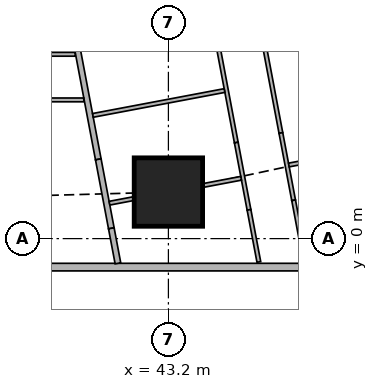
"""IFC4 building model, lengths in metres.
Left out: names, types, materials, properties, quantities, classifications, styles, units other than length and angle.
Written with IfcOpenShell. Run it as: python <this file> out.ifc"""

import sys

from ifc_helpers import new_model, si_unit, direction, frame, frame_2d, origin, origin_2d, place, context, subcontext, project, spatial, rectangle, extrude, element, fill, save


model = new_model("IFC4")
c1 = context("Model", 3, precision=1e-05, world=origin(), true_north=direction((0.0, 1.0)))
c2 = subcontext(c1, "Body", "Model", "MODEL_VIEW")
j1 = project(units=[si_unit("LENGTHUNIT", "METRE"), si_unit("PLANEANGLEUNIT", "RADIAN")], contexts=[c1])
p1 = place(None, origin())
s1 = spatial("IfcSite", under=j1, at=p1, CompositionType="ELEMENT")
p2 = place(p1, origin())
s2 = spatial("IfcBuilding", under=s1, at=p2, CompositionType="ELEMENT")
p3 = place(p2, frame((0.0, 0.0, 139.55)))
s3 = spatial("IfcBuildingStorey", under=s2, at=p3, CompositionType="ELEMENT", Elevation=139.55)
p4 = place(p3, frame((43.2, 1.225, 0.0), z_axis=(0.0, 0.0, 1.0), x_axis=(1.0, 0.0, 0.0)))
e1 = element("IfcColumn", 1, at=p4, inside=s3, PredefinedType="COLUMN", context=c2, shape_type="SweptSolid", body=[
    extrude(rectangle(XDim=1.8, YDim=1.8, at=origin_2d()), origin(), (0.0, 0.0, 1.0), 3.75),
])
p5 = place(p3, frame((2.163, -0.75, 0.0), z_axis=(0.0, 0.0, 1.0), x_axis=(1.0, 0.0, 0.0)))
e2 = element("IfcWall", 2, at=p5, inside=s3, PredefinedType="SOLIDWALL", context=c2, shape_type="SweptSolid", body=[
    extrude(rectangle(XDim=45.628, YDim=0.2, at=frame_2d((22.814, 0.0))), origin(), (0.0, 0.0, 1.0), 3.5),
])
p6 = place(p5, frame((9.537, 0.0, 0.9)))
e3 = element("IfcOpeningElement", 3, at=p6, cuts=e2, PredefinedType="OPENING", context=c2, shape_type="SweptSolid", body=[
    extrude(rectangle(XDim=1.8, YDim=1.5, at=frame_2d((0.9, 0.75))), frame((0.0, 0.11, 0.0), z_axis=(0.0, -1.0, 0.0), x_axis=(1.0, 0.0, 0.0)), (0.0, 0.0, 1.0), 0.22),
])
p7 = place(p5, frame((13.137, 0.0, 0.9)))
e4 = element("IfcOpeningElement", 4, at=p7, cuts=e2, PredefinedType="OPENING", context=c2, shape_type="SweptSolid", body=[
    extrude(rectangle(XDim=1.8, YDim=1.5, at=frame_2d((0.9, 0.75))), frame((0.0, 0.11, 0.0), z_axis=(0.0, -1.0, 0.0), x_axis=(1.0, 0.0, 0.0)), (0.0, 0.0, 1.0), 0.22),
])
p8 = place(p5, frame((16.737, 0.0, 0.9)))
e5 = element("IfcOpeningElement", 5, at=p8, cuts=e2, PredefinedType="OPENING", context=c2, shape_type="SweptSolid", body=[
    extrude(rectangle(XDim=1.8, YDim=1.5, at=frame_2d((0.9, 0.75))), frame((0.0, 0.11, 0.0), z_axis=(0.0, -1.0, 0.0), x_axis=(1.0, 0.0, 0.0)), (0.0, 0.0, 1.0), 0.22),
])
p9 = place(p5, frame((20.337, 0.0, 0.9)))
e6 = element("IfcOpeningElement", 6, at=p9, cuts=e2, PredefinedType="OPENING", context=c2, shape_type="SweptSolid", body=[
    extrude(rectangle(XDim=1.8, YDim=1.5, at=frame_2d((0.9, 0.75))), frame((0.0, 0.11, 0.0), z_axis=(0.0, -1.0, 0.0), x_axis=(1.0, 0.0, 0.0)), (0.0, 0.0, 1.0), 0.22),
])
p10 = place(p5, frame((23.937, 0.0, 0.9)))
e7 = element("IfcOpeningElement", 7, at=p10, cuts=e2, PredefinedType="OPENING", context=c2, shape_type="SweptSolid", body=[
    extrude(rectangle(XDim=1.8, YDim=1.5, at=frame_2d((0.9, 0.75))), frame((0.0, 0.11, 0.0), z_axis=(0.0, -1.0, 0.0), x_axis=(1.0, 0.0, 0.0)), (0.0, 0.0, 1.0), 0.22),
])
p11 = place(p5, frame((27.537, 0.0, 0.9)))
e8 = element("IfcOpeningElement", 8, at=p11, cuts=e2, PredefinedType="OPENING", context=c2, shape_type="SweptSolid", body=[
    extrude(rectangle(XDim=1.8, YDim=1.5, at=frame_2d((0.9, 0.75))), frame((0.0, 0.11, 0.0), z_axis=(0.0, -1.0, 0.0), x_axis=(1.0, 0.0, 0.0)), (0.0, 0.0, 1.0), 0.22),
])
p12 = place(p5, frame((31.137, 0.0, 0.9)))
e9 = element("IfcOpeningElement", 9, at=p12, cuts=e2, PredefinedType="OPENING", context=c2, shape_type="SweptSolid", body=[
    extrude(rectangle(XDim=1.8, YDim=1.5, at=frame_2d((0.9, 0.75))), frame((0.0, 0.11, 0.0), z_axis=(0.0, -1.0, 0.0), x_axis=(1.0, 0.0, 0.0)), (0.0, 0.0, 1.0), 0.22),
])
p13 = place(p5, frame((34.737, 0.0, 0.9)))
e10 = element("IfcOpeningElement", 10, at=p13, cuts=e2, PredefinedType="OPENING", context=c2, shape_type="SweptSolid", body=[
    extrude(rectangle(XDim=1.8, YDim=1.5, at=frame_2d((0.9, 0.75))), frame((0.0, 0.11, 0.0), z_axis=(0.0, -1.0, 0.0), x_axis=(1.0, 0.0, 0.0)), (0.0, 0.0, 1.0), 0.22),
])
p14 = place(p3, frame((50.653, 2.703, 0.0), z_axis=(0.0, 0.0, 1.0), x_axis=(-0.185612026696, 0.982623109613, 0.0)))
e11 = element("IfcWall", 11, at=p14, inside=s3, PredefinedType="SOLIDWALL", context=c2, shape_type="SweptSolid", body=[
    extrude(rectangle(XDim=41.393, YDim=0.2, at=frame_2d((20.697, 0.0))), origin(), (0.0, 0.0, 1.0), 3.5),
])
p15 = place(p14, frame((1.633, 0.0, 0.9)))
e12 = element("IfcOpeningElement", 12, at=p15, cuts=e11, PredefinedType="OPENING", context=c2, shape_type="SweptSolid", body=[
    extrude(rectangle(XDim=1.8, YDim=1.5, at=frame_2d((0.9, 0.75))), frame((0.0, 0.11, 0.0), z_axis=(0.0, -1.0, 0.0), x_axis=(1.0, 0.0, 0.0)), (0.0, 0.0, 1.0), 0.22),
])
p16 = place(p14, frame((6.032, 0.0, 0.9)))
e13 = element("IfcOpeningElement", 13, at=p16, cuts=e11, PredefinedType="OPENING", context=c2, shape_type="SweptSolid", body=[
    extrude(rectangle(XDim=1.8, YDim=1.5, at=frame_2d((0.9, 0.75))), frame((0.0, 0.11, 0.0), z_axis=(0.0, -1.0, 0.0), x_axis=(1.0, 0.0, 0.0)), (0.0, 0.0, 1.0), 0.22),
])
p17 = place(p14, frame((9.848, 0.0, 0.9)))
e14 = element("IfcOpeningElement", 14, at=p17, cuts=e11, PredefinedType="OPENING", context=c2, shape_type="SweptSolid", body=[
    extrude(rectangle(XDim=1.8, YDim=1.5, at=frame_2d((0.9, 0.75))), frame((0.0, 0.11, 0.0), z_axis=(0.0, -1.0, 0.0), x_axis=(1.0, 0.0, 0.0)), (0.0, 0.0, 1.0), 0.22),
])
p18 = place(p14, frame((13.664, 0.0, 0.9)))
e15 = element("IfcOpeningElement", 15, at=p18, cuts=e11, PredefinedType="OPENING", context=c2, shape_type="SweptSolid", body=[
    extrude(rectangle(XDim=1.8, YDim=1.5, at=frame_2d((0.9, 0.75))), frame((0.0, 0.11, 0.0), z_axis=(0.0, -1.0, 0.0), x_axis=(1.0, 0.0, 0.0)), (0.0, 0.0, 1.0), 0.22),
])
p19 = place(p14, frame((17.481, 0.0, 0.9)))
e16 = element("IfcOpeningElement", 16, at=p19, cuts=e11, PredefinedType="OPENING", context=c2, shape_type="SweptSolid", body=[
    extrude(rectangle(XDim=1.8, YDim=1.5, at=frame_2d((0.9, 0.75))), frame((0.0, 0.11, 0.0), z_axis=(0.0, -1.0, 0.0), x_axis=(1.0, 0.0, 0.0)), (0.0, 0.0, 1.0), 0.22),
])
p20 = place(p14, frame((21.297, 0.0, 0.9)))
e17 = element("IfcOpeningElement", 17, at=p20, cuts=e11, PredefinedType="OPENING", context=c2, shape_type="SweptSolid", body=[
    extrude(rectangle(XDim=1.8, YDim=1.5, at=frame_2d((0.9, 0.75))), frame((0.0, 0.11, 0.0), z_axis=(0.0, -1.0, 0.0), x_axis=(1.0, 0.0, 0.0)), (0.0, 0.0, 1.0), 0.22),
])
p21 = place(p14, frame((25.113, 0.0, 0.9)))
e18 = element("IfcOpeningElement", 18, at=p21, cuts=e11, PredefinedType="OPENING", context=c2, shape_type="SweptSolid", body=[
    extrude(rectangle(XDim=1.8, YDim=1.5, at=frame_2d((0.9, 0.75))), frame((0.0, 0.11, 0.0), z_axis=(0.0, -1.0, 0.0), x_axis=(1.0, 0.0, 0.0)), (0.0, 0.0, 1.0), 0.22),
])
p22 = place(p14, frame((28.93, 0.0, 0.9)))
e19 = element("IfcOpeningElement", 19, at=p22, cuts=e11, PredefinedType="OPENING", context=c2, shape_type="SweptSolid", body=[
    extrude(rectangle(XDim=1.8, YDim=1.5, at=frame_2d((0.9, 0.75))), frame((0.0, 0.11, 0.0), z_axis=(0.0, -1.0, 0.0), x_axis=(1.0, 0.0, 0.0)), (0.0, 0.0, 1.0), 0.22),
])
p23 = place(p14, frame((32.746, 0.0, 0.9)))
e20 = element("IfcOpeningElement", 20, at=p23, cuts=e11, PredefinedType="OPENING", context=c2, shape_type="SweptSolid", body=[
    extrude(rectangle(XDim=1.8, YDim=1.5, at=frame_2d((0.9, 0.75))), frame((0.0, 0.11, 0.0), z_axis=(0.0, -1.0, 0.0), x_axis=(1.0, 0.0, 0.0)), (0.0, 0.0, 1.0), 0.22),
])
p24 = place(p14, frame((36.481, 0.0, 0.9)))
e21 = element("IfcOpeningElement", 21, at=p24, cuts=e11, PredefinedType="OPENING", context=c2, shape_type="SweptSolid", body=[
    extrude(rectangle(XDim=1.8, YDim=1.5, at=frame_2d((0.9, 0.75))), frame((0.0, 0.11, 0.0), z_axis=(0.0, -1.0, 0.0), x_axis=(1.0, 0.0, 0.0)), (0.0, 0.0, 1.0), 0.22),
])
p25 = place(p3, frame((33.623, 43.022, 0.0), z_axis=(0.0, 0.0, 1.0), x_axis=(0.185596841028, -0.98262597798, 0.0)))
e22 = element("IfcWall", 22, at=p25, inside=s3, PredefinedType="SOLIDWALL", context=c2, shape_type="SweptSolid", body=[
    extrude(rectangle(XDim=41.66, YDim=0.15, at=frame_2d((20.83, 0.0))), origin(), (0.0, 0.0, 1.0), 2.5),
])
p26 = place(p25, frame((20.242, 0.0, 0.0)))
e23 = element("IfcOpeningElement", 23, at=p26, cuts=e22, PredefinedType="OPENING", context=c2, shape_type="SweptSolid", body=[
    extrude(rectangle(XDim=1.0, YDim=2.1, at=frame_2d((0.5, 1.05))), frame((0.0, 0.085, 0.0), z_axis=(0.0, -1.0, 0.0), x_axis=(1.0, 0.0, 0.0)), (0.0, 0.0, 1.0), 0.17),
])
p27 = place(p25, frame((24.714, 0.0, 0.0)))
e24 = element("IfcOpeningElement", 24, at=p27, cuts=e22, PredefinedType="OPENING", context=c2, shape_type="SweptSolid", body=[
    extrude(rectangle(XDim=1.0, YDim=2.1, at=frame_2d((0.5, 1.05))), frame((0.0, 0.085, 0.0), z_axis=(0.0, -1.0, 0.0), x_axis=(1.0, 0.0, 0.0)), (0.0, 0.0, 1.0), 0.17),
])
p28 = place(p25, frame((31.206, 0.0, 0.0)))
e25 = element("IfcOpeningElement", 25, at=p28, cuts=e22, PredefinedType="OPENING", context=c2, shape_type="SweptSolid", body=[
    extrude(rectangle(XDim=1.0, YDim=2.1, at=frame_2d((0.5, 1.05))), frame((0.0, 0.085, 0.0), z_axis=(0.0, -1.0, 0.0), x_axis=(1.0, 0.0, 0.0)), (0.0, 0.0, 1.0), 0.17),
])
p29 = place(p3, frame((41.355, 2.086, 0.0), z_axis=(0.0, 0.0, 1.0), x_axis=(0.185708872674, -0.982604811005, 0.0)))
e26 = element("IfcWall", 26, at=p29, inside=s3, PredefinedType="SOLIDWALL", context=c2, shape_type="SweptSolid", body=[
    extrude(rectangle(XDim=1.847, YDim=0.15, at=frame_2d((0.924, 0.0))), origin(), (0.0, 0.0, 1.0), 2.1),
])
p30 = place(p3, frame((41.698, 0.271, 0.0), z_axis=(0.0, 0.0, 1.0), x_axis=(0.185735329995, -0.982599810295, 0.0)))
e27 = element("IfcWall", 27, at=p30, inside=s3, PredefinedType="SOLIDWALL", context=c2, shape_type="SweptSolid", body=[
    extrude(rectangle(XDim=0.937, YDim=0.15, at=frame_2d((0.469, 0.0))), origin(), (0.0, 0.0, 1.0), 3.5),
])
p31 = place(p3, frame((40.974, 3.65, 0.0), z_axis=(0.0, 0.0, 1.0), x_axis=(-1.0, 0.0, 0.0)))
e28 = element("IfcWall", 28, at=p31, inside=s3, PredefinedType="PARTITIONING", context=c2, shape_type="SweptSolid", body=[
    extrude(rectangle(XDim=4.974, YDim=0.1, at=frame_2d((2.487, 0.0))), origin(), (0.0, 0.0, 1.0), 3.5),
])
p32 = place(p31, frame((3.874, 0.0, 0.0)))
e29 = element("IfcOpeningElement", 29, at=p32, cuts=e28, PredefinedType="OPENING", context=c2, shape_type="SweptSolid", body=[
    extrude(rectangle(XDim=0.9, YDim=2.1, at=frame_2d((0.45, 1.05))), frame((0.0, 0.06, 0.0), z_axis=(0.0, -1.0, 0.0), x_axis=(1.0, 0.0, 0.0)), (0.0, 0.0, 1.0), 0.12),
])
p33 = place(p3, frame((40.747, 4.85, 0.0), z_axis=(0.0, 0.0, 1.0), x_axis=(-1.0, 0.0, 0.0)))
e30 = element("IfcWall", 30, at=p33, inside=s3, PredefinedType="PARTITIONING", context=c2, shape_type="SweptSolid", body=[
    extrude(rectangle(XDim=4.747, YDim=0.1, at=frame_2d((2.374, 0.0))), origin(), (0.0, 0.0, 1.0), 3.5),
])
p34 = place(p33, frame((3.272, 0.0, 0.0)))
e31 = element("IfcOpeningElement", 31, at=p34, cuts=e30, PredefinedType="OPENING", context=c2, shape_type="SweptSolid", body=[
    extrude(rectangle(XDim=0.9, YDim=2.1, at=frame_2d((0.45, 1.05))), frame((0.0, 0.06, 0.0), z_axis=(0.0, -1.0, 0.0), x_axis=(1.0, 0.0, 0.0)), (0.0, 0.0, 1.0), 0.12),
])
p35 = place(p33, frame((0.15, 0.0, 0.0)))
e32 = element("IfcOpeningElement", 32, at=p35, cuts=e30, PredefinedType="OPENING", context=c2, shape_type="SweptSolid", body=[
    extrude(rectangle(XDim=0.9, YDim=2.1, at=frame_2d((0.45, 1.05))), frame((0.0, 0.06, 0.0), z_axis=(0.0, -1.0, 0.0), x_axis=(1.0, 0.0, 0.0)), (0.0, 0.0, 1.0), 0.12),
])
p36 = place(p33, frame((1.472, 0.0, 0.0)))
e33 = element("IfcOpeningElement", 33, at=p36, cuts=e30, PredefinedType="OPENING", context=c2, shape_type="SweptSolid", body=[
    extrude(rectangle(XDim=0.9, YDim=2.1, at=frame_2d((0.45, 1.05))), frame((0.0, 0.06, 0.0), z_axis=(0.0, -1.0, 0.0), x_axis=(1.0, 0.0, 0.0)), (0.0, 0.0, 1.0), 0.12),
])
p37 = place(p3, frame((44.727, 10.366, 0.0), z_axis=(0.0, 0.0, 1.0), x_axis=(0.185578957652, -0.982629355595, 0.0)))
e34 = element("IfcWall", 34, at=p37, inside=s3, PredefinedType="PARTITIONING", context=c2, shape_type="SweptSolid", body=[
    extrude(rectangle(XDim=7.721, YDim=0.1, at=frame_2d((3.86, 0.0))), origin(), (0.0, 0.0, 1.0), 3.5),
])
p38 = place(p37, frame((0.151, 0.0, 0.0)))
e35 = element("IfcOpeningElement", 35, at=p38, cuts=e34, PredefinedType="OPENING", context=c2, shape_type="SweptSolid", body=[
    extrude(rectangle(XDim=0.9, YDim=2.1, at=frame_2d((0.45, 1.05))), frame((0.0, 0.06, 0.0), z_axis=(0.0, -1.0, 0.0), x_axis=(1.0, 0.0, 0.0)), (0.0, 0.0, 1.0), 0.12),
])
p39 = place(p37, frame((3.806, 0.0, 0.0)))
e36 = element("IfcOpeningElement", 36, at=p39, cuts=e34, PredefinedType="OPENING", context=c2, shape_type="SweptSolid", body=[
    extrude(rectangle(XDim=0.9, YDim=2.1, at=frame_2d((0.45, 1.05))), frame((0.0, 0.06, 0.0), z_axis=(0.0, -1.0, 0.0), x_axis=(1.0, 0.0, 0.0)), (0.0, 0.0, 1.0), 0.12),
])
p40 = place(p3, frame((46.16, 2.779, 0.0), z_axis=(0.0, 0.0, 1.0), x_axis=(0.18597295662, -0.982554863306, 0.0)))
e37 = element("IfcWall", 37, at=p40, inside=s3, PredefinedType="PARTITIONING", context=c2, shape_type="SweptSolid", body=[
    extrude(rectangle(XDim=1.802, YDim=0.1, at=frame_2d((0.901, 0.0))), origin(), (0.0, 0.0, 1.0), 2.1),
])
p41 = place(p3, frame((46.495, 1.008, 0.0), z_axis=(0.0, 0.0, 1.0), x_axis=(0.185535059532, -0.982637645159, 0.0)))
e38 = element("IfcWall", 38, at=p41, inside=s3, PredefinedType="PARTITIONING", context=c2, shape_type="SweptSolid", body=[
    extrude(rectangle(XDim=1.644, YDim=0.1, at=frame_2d((0.822, 0.0))), origin(), (0.0, 0.0, 1.0), 3.5),
])
p42 = place(p3, frame((43.999, 7.755, 0.0), z_axis=(0.0, 0.0, 1.0), x_axis=(0.185565904578, -0.982631820703, 0.0)))
e39 = element("IfcWall", 39, at=p42, inside=s3, PredefinedType="PARTITIONING", context=c2, shape_type="SweptSolid", body=[
    extrude(rectangle(XDim=5.319, YDim=0.1, at=frame_2d((2.66, 0.0))), origin(), (0.0, 0.0, 1.0), 3.5),
])
p43 = place(p42, frame((1.0, 0.0, 0.0)))
e40 = element("IfcOpeningElement", 40, at=p43, cuts=e39, PredefinedType="OPENING", context=c2, shape_type="SweptSolid", body=[
    extrude(rectangle(XDim=0.9, YDim=2.1, at=frame_2d((0.45, 1.05))), frame((0.0, 0.06, 0.0), z_axis=(0.0, -1.0, 0.0), x_axis=(1.0, 0.0, 0.0)), (0.0, 0.0, 1.0), 0.12),
])
p44 = place(p42, frame((4.269, 0.0, 0.0)))
e41 = element("IfcOpeningElement", 41, at=p44, cuts=e39, PredefinedType="OPENING", context=c2, shape_type="SweptSolid", body=[
    extrude(rectangle(XDim=0.9, YDim=2.1, at=frame_2d((0.45, 1.05))), frame((0.0, 0.06, 0.0), z_axis=(0.0, -1.0, 0.0), x_axis=(1.0, 0.0, 0.0)), (0.0, 0.0, 1.0), 0.12),
])
p45 = place(p42, frame((2.585, 0.0, 0.0)))
e42 = element("IfcOpeningElement", 42, at=p45, cuts=e39, PredefinedType="OPENING", context=c2, shape_type="SweptSolid", body=[
    extrude(rectangle(XDim=0.9, YDim=2.1, at=frame_2d((0.45, 1.05))), frame((0.0, 0.06, 0.0), z_axis=(0.0, -1.0, 0.0), x_axis=(1.0, 0.0, 0.0)), (0.0, 0.0, 1.0), 0.12),
])
p46 = place(p3, frame((44.986, 2.528, 0.0), z_axis=(0.0, 0.0, 1.0), x_axis=(0.18584218627, -0.982579605835, 0.0)))
e43 = element("IfcWall", 43, at=p46, inside=s3, PredefinedType="PARTITIONING", context=c2, shape_type="SweptSolid", body=[
    extrude(rectangle(XDim=1.802, YDim=0.1, at=frame_2d((0.901, 0.0))), origin(), (0.0, 0.0, 1.0), 2.1),
])
p47 = place(p3, frame((45.321, 0.757, 0.0), z_axis=(0.0, 0.0, 1.0), x_axis=(0.185640562635, -0.982617718904, 0.0)))
e44 = element("IfcWall", 44, at=p47, inside=s3, PredefinedType="PARTITIONING", context=c2, shape_type="SweptSolid", body=[
    extrude(rectangle(XDim=1.395, YDim=0.1, at=frame_2d((0.698, 0.0))), origin(), (0.0, 0.0, 1.0), 3.5),
])
p48 = place(p47, frame((0.15, 0.0, 0.0)))
e45 = element("IfcOpeningElement", 45, at=p48, cuts=e44, PredefinedType="OPENING", context=c2, shape_type="SweptSolid", body=[
    extrude(rectangle(XDim=0.9, YDim=2.1, at=frame_2d((0.45, 1.05))), frame((0.0, 0.06, 0.0), z_axis=(0.0, -1.0, 0.0), x_axis=(1.0, 0.0, 0.0)), (0.0, 0.0, 1.0), 0.12),
])
p49 = place(p3, frame((46.738, 2.006, 0.0), z_axis=(0.0, 0.0, 1.0), x_axis=(-0.982820466874, -0.184564161994, 0.0)))
e46 = element("IfcWall", 46, at=p49, inside=s3, PredefinedType="PARTITIONING", context=c2, shape_type="SweptSolid", body=[
    extrude(rectangle(XDim=0.374, YDim=0.1, at=frame_2d((0.187, 0.0))), origin(), (0.0, 0.0, 1.0), 2.1),
])
p50 = place(p3, frame((45.114, 1.587, 0.0), z_axis=(0.0, 0.0, 1.0), x_axis=(-0.982567886437, -0.185904138047, 0.0)))
e47 = element("IfcWall", 47, at=p50, inside=s3, PredefinedType="PARTITIONING", context=c2, shape_type="SweptSolid", body=[
    extrude(rectangle(XDim=1.022, YDim=0.1, at=frame_2d((0.511, 0.0))), origin(), (0.0, 0.0, 1.0), 2.1),
])
p51 = place(p3, frame((42.29, 1.053, 0.0), z_axis=(0.0, 0.0, 1.0), x_axis=(-0.982573945355, -0.185872111707, 0.0)))
e48 = element("IfcWall", 48, at=p51, inside=s3, PredefinedType="PARTITIONING", context=c2, shape_type="SweptSolid", body=[
    extrude(rectangle(XDim=0.652, YDim=0.1, at=frame_2d((0.326, 0.0))), origin(), (0.0, 0.0, 1.0), 2.1),
])
p52 = place(p3, frame((44.677, 3.896, 0.0), z_axis=(0.0, 0.0, 1.0), x_axis=(-0.982638553676, -0.185530247748, 0.0)))
e49 = element("IfcWall", 49, at=p52, inside=s3, PredefinedType="PARTITIONING", context=c2, shape_type="SweptSolid", body=[
    extrude(rectangle(XDim=3.525, YDim=0.1, at=frame_2d((1.763, 0.0))), origin(), (0.0, 0.0, 1.0), 3.5),
])
p53 = place(p35, origin())
e50 = element("IfcDoor", 50, at=p53, inside=s3, OperationType="SINGLE_SWING_RIGHT", PredefinedType="DOOR", context=c2, shape_type="SweptSolid", body=[
    extrude(rectangle(XDim=0.9, YDim=2.1, at=frame_2d((0.45, 1.05))), frame((0.0, 0.025, 0.0), z_axis=(0.0, -1.0, 0.0), x_axis=(1.0, 0.0, 0.0)), (0.0, 0.0, 1.0), 0.05),
])
fill(e32, e50)
p54 = place(p44, origin())
e51 = element("IfcDoor", 51, at=p54, inside=s3, OperationType="SINGLE_SWING_LEFT", PredefinedType="DOOR", context=c2, shape_type="SweptSolid", body=[
    extrude(rectangle(XDim=0.9, YDim=2.1, at=frame_2d((0.45, 1.05))), frame((0.0, 0.025, 0.0), z_axis=(0.0, -1.0, 0.0), x_axis=(1.0, 0.0, 0.0)), (0.0, 0.0, 1.0), 0.05),
])
fill(e41, e51)
p55 = place(p48, origin())
e52 = element("IfcDoor", 52, at=p55, inside=s3, OperationType="SINGLE_SWING_RIGHT", PredefinedType="DOOR", context=c2, shape_type="SweptSolid", body=[
    extrude(rectangle(XDim=0.9, YDim=2.1, at=frame_2d((0.45, 1.05))), frame((0.0, 0.025, 0.0), z_axis=(0.0, -1.0, 0.0), x_axis=(1.0, 0.0, 0.0)), (0.0, 0.0, 1.0), 0.05),
])
fill(e45, e52)
p56 = place(p45, origin())
e53 = element("IfcDoor", 53, at=p56, inside=s3, OperationType="SINGLE_SWING_LEFT", PredefinedType="DOOR", context=c2, shape_type="SweptSolid", body=[
    extrude(rectangle(XDim=0.9, YDim=2.1, at=frame_2d((0.45, 1.05))), frame((0.0, 0.025, 0.0), z_axis=(0.0, -1.0, 0.0), x_axis=(1.0, 0.0, 0.0)), (0.0, 0.0, 1.0), 0.05),
])
fill(e42, e53)
save(model, sys.argv[1])
